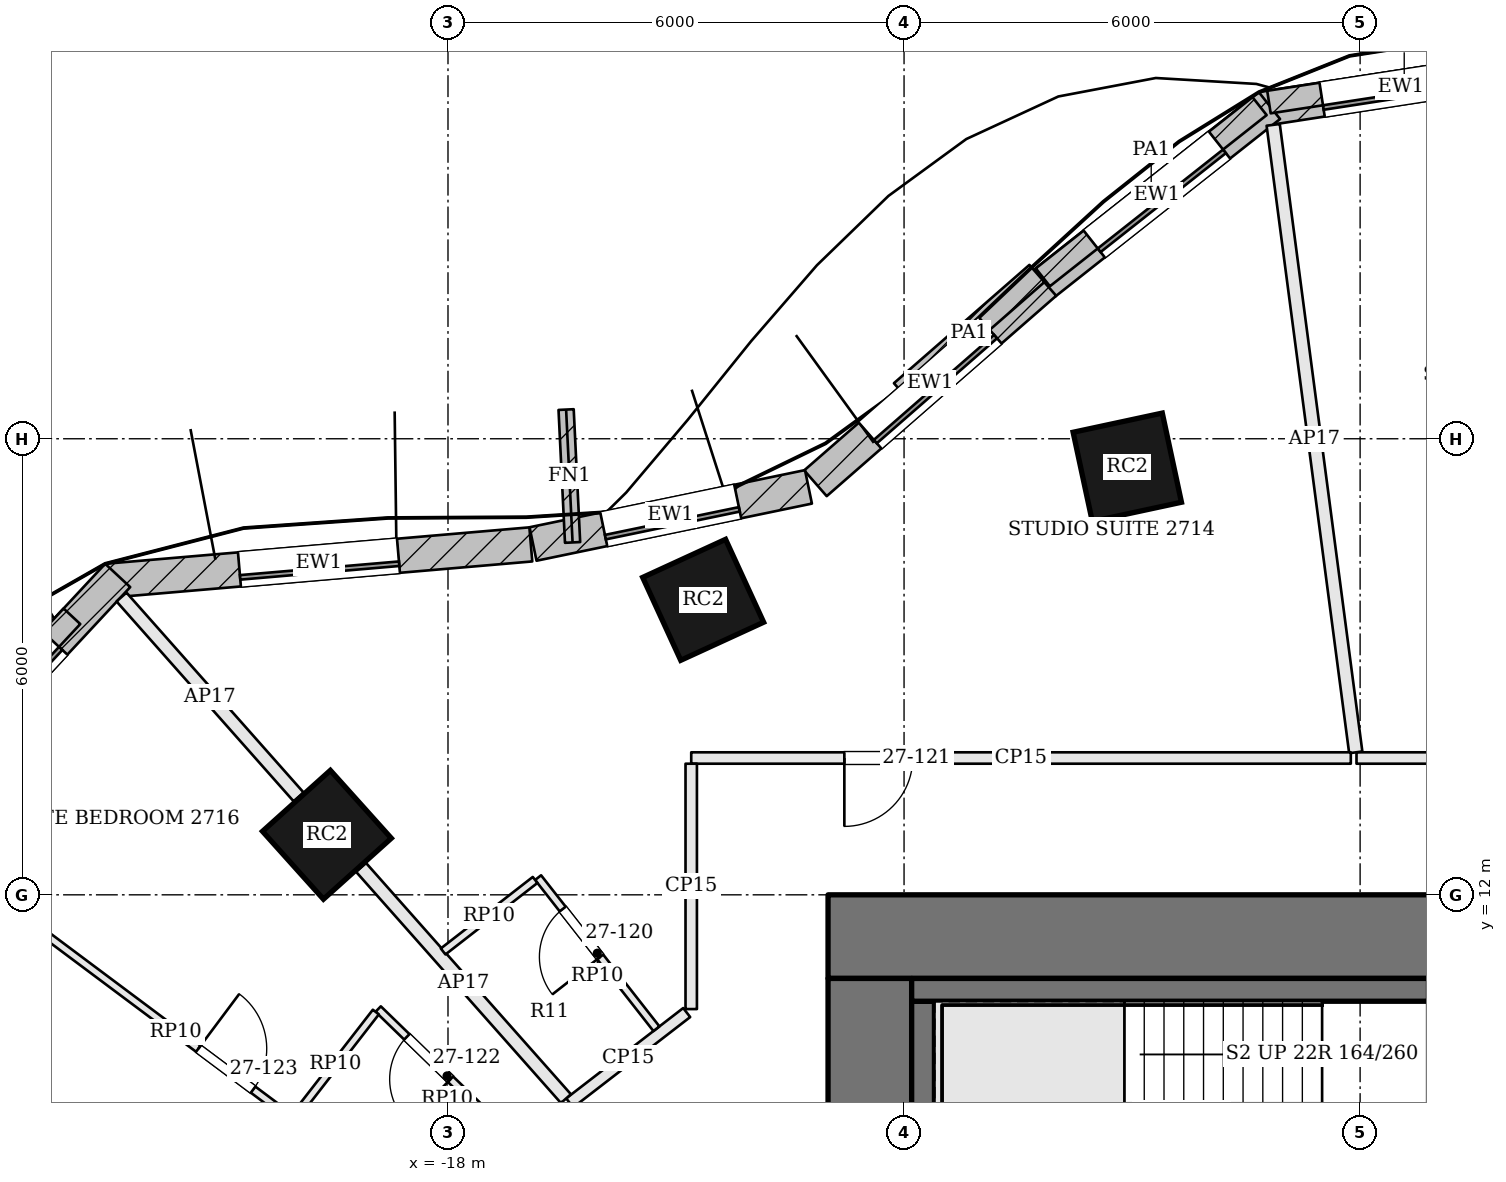
"""IFC4 building model, lengths in metres.
Left out: names, types, materials, properties, quantities, classifications, styles, units other than length and angle.
Written with IfcOpenShell. Run it as: python <this file> out.ifc"""

import sys

from ifc_helpers import new_model, si_unit, direction, frame, frame_2d, origin, origin_2d, place, context, subcontext, project, spatial, rectangle, extrude, element, fill, save


model = new_model("IFC4")
c1 = context("Model", 3, precision=1e-05, world=origin(), true_north=direction((0.0, 1.0)))
c2 = subcontext(c1, "Body", "Model", "MODEL_VIEW")
j1 = project(units=[si_unit("LENGTHUNIT", "METRE"), si_unit("PLANEANGLEUNIT", "RADIAN")], contexts=[c1])
p1 = place(None, origin())
s1 = spatial("IfcSite", under=j1, at=p1, CompositionType="ELEMENT")
p2 = place(p1, origin())
s2 = spatial("IfcBuilding", under=s1, at=p2, CompositionType="ELEMENT")
p3 = place(p2, frame((0.0, 0.0, 114.0)))
s3 = spatial("IfcBuildingStorey", under=s2, at=p3, CompositionType="ELEMENT", Elevation=114.0)
p4 = place(p3, frame((-13.0, 11.45, 0.0), z_axis=(0.0, 0.0, 1.0), x_axis=(1.0, 0.0, 0.0)))
e1 = element("IfcWall", 1, at=p4, inside=s3, PredefinedType="SHEAR", context=c2, shape_type="SweptSolid", body=[
    extrude(rectangle(XDim=26.0, YDim=1.1, at=frame_2d((13.0, 0.0))), origin(), (0.0, 0.0, 1.0), 3.6),
])
p5 = place(p4, frame((9.225, 0.0, 0.0)))
e2 = element("IfcOpeningElement", 2, at=p5, cuts=e1, PredefinedType="OPENING", context=c2, shape_type="SweptSolid", body=[
    extrude(rectangle(XDim=1.0, YDim=2.1, at=frame_2d((0.5, 1.05))), frame((0.0, 0.56, 0.0), z_axis=(0.0, -1.0, 0.0), x_axis=(1.0, 0.0, 0.0)), (0.0, 0.0, 1.0), 1.12),
])
p6 = place(p4, frame((11.825, 0.0, 0.0)))
e3 = element("IfcOpeningElement", 3, at=p6, cuts=e1, PredefinedType="OPENING", context=c2, shape_type="SweptSolid", body=[
    extrude(rectangle(XDim=0.7, YDim=2.1, at=frame_2d((0.35, 1.05))), frame((0.0, 0.56, 0.0), z_axis=(0.0, -1.0, 0.0), x_axis=(1.0, 0.0, 0.0)), (0.0, 0.0, 1.0), 1.12),
])
p7 = place(p4, frame((13.725, 0.0, 0.0)))
e4 = element("IfcOpeningElement", 4, at=p7, cuts=e1, PredefinedType="OPENING", context=c2, shape_type="SweptSolid", body=[
    extrude(rectangle(XDim=1.0, YDim=2.1, at=frame_2d((0.5, 1.05))), frame((0.0, 0.56, 0.0), z_axis=(0.0, -1.0, 0.0), x_axis=(1.0, 0.0, 0.0)), (0.0, 0.0, 1.0), 1.12),
])
p8 = place(p4, frame((16.225, 0.0, 0.0)))
e5 = element("IfcOpeningElement", 5, at=p8, cuts=e1, PredefinedType="OPENING", context=c2, shape_type="SweptSolid", body=[
    extrude(rectangle(XDim=0.9, YDim=2.1, at=frame_2d((0.45, 1.05))), frame((0.0, 0.56, 0.0), z_axis=(0.0, -1.0, 0.0), x_axis=(1.0, 0.0, 0.0)), (0.0, 0.0, 1.0), 1.12),
])
p9 = place(p3, frame((-12.45, -1.9, 0.0), z_axis=(0.0, 0.0, 1.0), x_axis=(0.0, 1.0, 0.0)))
e6 = element("IfcWall", 6, at=p9, inside=s3, PredefinedType="SHEAR", context=c2, shape_type="SweptSolid", body=[
    extrude(rectangle(XDim=12.8, YDim=1.1, at=frame_2d((6.4, 0.0))), origin(), (0.0, 0.0, 1.0), 3.6),
])
p10 = place(p9, frame((3.9, 0.0, 0.0)))
e7 = element("IfcOpeningElement", 7, at=p10, cuts=e6, PredefinedType="OPENING", context=c2, shape_type="SweptSolid", body=[
    extrude(rectangle(XDim=1.8, YDim=2.1, at=frame_2d((0.9, 1.05))), frame((0.0, 0.56, 0.0), z_axis=(0.0, -1.0, 0.0), x_axis=(1.0, 0.0, 0.0)), (0.0, 0.0, 1.0), 1.12),
])
for number, where, z_axis, x_axis in (
    (8, (-9.063, 17.625, 0.0), (0.0, 0.0, 1.0), (-0.978, -0.21, 0.0)),
    (9, (-14.643, 15.881, 0.0), (0.0, 0.0, 1.0), (-0.909, -0.417, 0.0)),
    (10, (-19.593, 12.79, 0.0), (0.0, 0.0, 1.0), (-0.744, -0.668, 0.0)),
):
    element("IfcColumn", number, at=place(p3, frame(where, z_axis=z_axis, x_axis=x_axis)), inside=s3, PredefinedType="COLUMN", context=c2, shape_type="SweptSolid", body=[
        extrude(rectangle(XDim=1.2, YDim=1.2, at=origin_2d()), origin(), (0.0, 0.0, 1.0), 3.6),
    ])
p11 = place(p3, frame((-3.629, 22.905, 0.0), z_axis=(0.0, 0.0, 1.0), x_axis=(-0.988300084321, -0.152521943772, 0.0)))
e11 = element("IfcWall", 11, at=p11, inside=s3, PredefinedType="SOLIDWALL", context=c2, shape_type="SweptSolid", body=[
    extrude(rectangle(XDim=3.71, YDim=0.45, at=frame_2d((1.855, 0.0))), origin(), (0.0, 0.0, 1.0), 3.4),
])
p12 = place(p11, frame((0.805, 0.0, 0.9)))
e12 = element("IfcOpeningElement", 12, at=p12, cuts=e11, PredefinedType="OPENING", context=c2, shape_type="SweptSolid", body=[
    extrude(rectangle(XDim=2.1, YDim=2.0, at=frame_2d((1.05, 1.0))), frame((0.0, 0.235, 0.0), z_axis=(0.0, -1.0, 0.0), x_axis=(1.0, 0.0, 0.0)), (0.0, 0.0, 1.0), 0.47),
])
p13 = place(p3, frame((-7.193, 22.383, 0.0), z_axis=(0.0, 0.0, 1.0), x_axis=(-0.784803291184, -0.619744942816, 0.0)))
e13 = element("IfcWall", 13, at=p13, inside=s3, PredefinedType="SOLIDWALL", context=c2, shape_type="SweptSolid", body=[
    extrude(rectangle(XDim=3.775, YDim=0.45, at=frame_2d((1.887, 0.0))), origin(), (0.0, 0.0, 1.0), 3.4),
])
p14 = place(p13, frame((0.837, 0.0, 0.9)))
e14 = element("IfcOpeningElement", 14, at=p14, cuts=e13, PredefinedType="OPENING", context=c2, shape_type="SweptSolid", body=[
    extrude(rectangle(XDim=2.1, YDim=2.0, at=frame_2d((1.05, 1.0))), frame((0.0, 0.235, 0.0), z_axis=(0.0, -1.0, 0.0), x_axis=(1.0, 0.0, 0.0)), (0.0, 0.0, 1.0), 0.47),
])
p15 = place(p3, frame((-10.146, 20.051, 0.0), z_axis=(0.0, 0.0, 1.0), x_axis=(-0.753278140428, -0.657702093013, 0.0)))
e15 = element("IfcWall", 15, at=p15, inside=s3, PredefinedType="SOLIDWALL", context=c2, shape_type="SweptSolid", body=[
    extrude(rectangle(XDim=4.008, YDim=0.45, at=frame_2d((2.004, 0.0))), origin(), (0.0, 0.0, 1.0), 3.4),
])
p16 = place(p15, frame((0.954, 0.0, 0.9)))
e16 = element("IfcOpeningElement", 16, at=p16, cuts=e15, PredefinedType="OPENING", context=c2, shape_type="SweptSolid", body=[
    extrude(rectangle(XDim=2.1, YDim=2.0, at=frame_2d((1.05, 1.0))), frame((0.0, 0.235, 0.0), z_axis=(0.0, -1.0, 0.0), x_axis=(1.0, 0.0, 0.0)), (0.0, 0.0, 1.0), 0.47),
])
p17 = place(p3, frame((-13.258, 17.367, 0.0), z_axis=(0.0, 0.0, 1.0), x_axis=(-0.97914968674, -0.203140077183, 0.0)))
e17 = element("IfcWall", 17, at=p17, inside=s3, PredefinedType="SOLIDWALL", context=c2, shape_type="SweptSolid", body=[
    extrude(rectangle(XDim=3.7, YDim=0.45, at=frame_2d((1.85, 0.0))), origin(), (0.0, 0.0, 1.0), 3.4),
])
p18 = place(p17, frame((0.95, 0.0, 0.9)))
e18 = element("IfcOpeningElement", 18, at=p18, cuts=e17, PredefinedType="OPENING", context=c2, shape_type="SweptSolid", body=[
    extrude(rectangle(XDim=1.8, YDim=2.0, at=frame_2d((0.9, 1.0))), frame((0.0, 0.235, 0.0), z_axis=(0.0, -1.0, 0.0), x_axis=(1.0, 0.0, 0.0)), (0.0, 0.0, 1.0), 0.47),
])
p19 = place(p3, frame((-16.91, 16.61, 0.0), z_axis=(0.0, 0.0, 1.0), x_axis=(-0.996333165816, -0.085558299972, 0.0)))
e19 = element("IfcWall", 19, at=p19, inside=s3, PredefinedType="SOLIDWALL", context=c2, shape_type="SweptSolid", body=[
    extrude(rectangle(XDim=5.596, YDim=0.45, at=frame_2d((2.798, 0.0))), origin(), (0.0, 0.0, 1.0), 3.4),
])
p20 = place(p19, frame((1.748, 0.0, 0.9)))
e20 = element("IfcOpeningElement", 20, at=p20, cuts=e19, PredefinedType="OPENING", context=c2, shape_type="SweptSolid", body=[
    extrude(rectangle(XDim=2.1, YDim=2.0, at=frame_2d((1.05, 1.0))), frame((0.0, 0.235, 0.0), z_axis=(0.0, -1.0, 0.0), x_axis=(1.0, 0.0, 0.0)), (0.0, 0.0, 1.0), 0.47),
])
p21 = place(p3, frame((-22.345, 16.202, 0.0), z_axis=(0.0, 0.0, 1.0), x_axis=(-0.681249161265, -0.732051624051, 0.0)))
e21 = element("IfcWall", 21, at=p21, inside=s3, PredefinedType="SOLIDWALL", context=c2, shape_type="SweptSolid", body=[
    extrude(rectangle(XDim=4.527, YDim=0.45, at=frame_2d((2.263, 0.0))), origin(), (0.0, 0.0, 1.0), 3.4),
])
p22 = place(p21, frame((1.213, 0.0, 0.9)))
e22 = element("IfcOpeningElement", 22, at=p22, cuts=e21, PredefinedType="OPENING", context=c2, shape_type="SweptSolid", body=[
    extrude(rectangle(XDim=2.1, YDim=2.0, at=frame_2d((1.05, 1.0))), frame((0.0, 0.235, 0.0), z_axis=(0.0, -1.0, 0.0), x_axis=(1.0, 0.0, 0.0)), (0.0, 0.0, 1.0), 0.47),
])
p23 = place(p3, frame((-16.361, 16.636, 0.0), z_axis=(0.0, 0.0, 1.0), x_axis=(-0.048552811097, 0.998820616795, 0.0)))
e23 = element("IfcWall", 23, at=p23, inside=s3, PredefinedType="SOLIDWALL", context=c2, shape_type="SweptSolid", body=[
    extrude(rectangle(XDim=1.75, YDim=0.2, at=frame_2d((0.875, 0.0))), origin(), (0.0, 0.0, 1.0), 3.4),
])
p24 = place(p3, frame((-3.64, 22.979, 3.6), z_axis=(0.0, 0.0, 1.0), x_axis=(-0.988299486994, -0.152525814235, 0.0)))
e24 = element("IfcWall", 24, at=p24, inside=s3, PredefinedType="PARAPET", context=c2, shape_type="SweptSolid", body=[
    extrude(rectangle(XDim=3.602, YDim=0.3, at=frame_2d((1.801, 0.0))), origin(), (0.0, 0.0, 1.0), 1.1),
])
p25 = place(p3, frame((-7.323, 22.376, 3.6), z_axis=(0.0, 0.0, 1.0), x_axis=(-0.784819122577, -0.61972489448, 0.0)))
e25 = element("IfcWall", 25, at=p25, inside=s3, PredefinedType="PARAPET", context=c2, shape_type="SweptSolid", body=[
    extrude(rectangle(XDim=3.633, YDim=0.3, at=frame_2d((1.817, 0.0))), origin(), (0.0, 0.0, 1.0), 1.1),
])
p26 = place(p3, frame((-10.252, 20.174, 3.6), z_axis=(0.0, 0.0, 1.0), x_axis=(-0.753260147018, -0.657722700622, 0.0)))
e26 = element("IfcWall", 26, at=p26, inside=s3, PredefinedType="PARAPET", context=c2, shape_type="SweptSolid", body=[
    extrude(rectangle(XDim=2.366, YDim=0.3, at=frame_2d((1.183, 0.0))), origin(), (0.0, 0.0, 1.0), 1.1),
])
p27 = place(p3, frame((-22.948, 15.665, 3.6), z_axis=(0.0, 0.0, 1.0), x_axis=(-0.681269800001, -0.732032417046, 0.0)))
e27 = element("IfcWall", 27, at=p27, inside=s3, PredefinedType="PARAPET", context=c2, shape_type="SweptSolid", body=[
    extrude(rectangle(XDim=3.578, YDim=0.3, at=frame_2d((1.789, 0.0))), origin(), (0.0, 0.0, 1.0), 1.1),
])
p28 = place(p3, frame((-11.75, 7.65, 0.0), z_axis=(0.0, 0.0, 1.0), x_axis=(0.0, 1.0, 0.0)))
e28 = element("IfcWall", 28, at=p28, inside=s3, PredefinedType="SOLIDWALL", context=c2, shape_type="SweptSolid", body=[
    extrude(rectangle(XDim=2.95, YDim=0.3, at=frame_2d((1.475, 0.0))), origin(), (0.0, 0.0, 1.0), 3.4),
])
p29 = place(p3, frame((-11.9, 10.75, 0.0), z_axis=(0.0, 0.0, 1.0), x_axis=(1.0, 0.0, 0.0)))
e29 = element("IfcWall", 29, at=p29, inside=s3, PredefinedType="SOLIDWALL", context=c2, shape_type="SweptSolid", body=[
    extrude(rectangle(XDim=6.8, YDim=0.3, at=frame_2d((3.4, 0.0))), origin(), (0.0, 0.0, 1.0), 3.4),
])
p30 = place(p3, frame((5.777, 13.8, 0.0), z_axis=(0.0, 0.0, 1.0), x_axis=(-1.0, 0.0, 0.0)))
e30 = element("IfcWall", 30, at=p30, inside=s3, PredefinedType="PARTITIONING", context=c2, shape_type="SweptSolid", body=[
    extrude(rectangle(XDim=11.824, YDim=0.15, at=frame_2d((5.912, 0.0))), origin(), (0.0, 0.0, 1.0), 2.784),
])
p31 = place(p30, frame((8.402, 0.0, 0.0)))
e31 = element("IfcOpeningElement", 31, at=p31, cuts=e30, PredefinedType="OPENING", context=c2, shape_type="SweptSolid", body=[
    extrude(rectangle(XDim=1.0, YDim=2.1, at=frame_2d((0.5, 1.05))), frame((0.0, 0.085, 0.0), z_axis=(0.0, -1.0, 0.0), x_axis=(1.0, 0.0, 0.0)), (0.0, 0.0, 1.0), 0.17),
])
p32 = place(p3, frame((-7.144, 22.13, 0.0), z_axis=(0.0, 0.0, 1.0), x_axis=(0.130452237095, -0.991454594945, 0.0)))
e32 = element("IfcWall", 32, at=p32, inside=s3, PredefinedType="PARTITIONING", context=c2, shape_type="SweptSolid", body=[
    extrude(rectangle(XDim=8.326, YDim=0.175, at=frame_2d((4.163, 0.0))), origin(), (0.0, 0.0, 1.0), 2.784),
])
p33 = place(p3, frame((-6.123, 13.8, 0.0), z_axis=(0.0, 0.0, 1.0), x_axis=(-1.0, 0.0, 0.0)))
e33 = element("IfcWall", 33, at=p33, inside=s3, PredefinedType="PARTITIONING", context=c2, shape_type="SweptSolid", body=[
    extrude(rectangle(XDim=8.677, YDim=0.15, at=frame_2d((4.339, 0.0))), origin(), (0.0, 0.0, 1.0), 2.784),
])
p34 = place(p33, frame((5.763, 0.0, 0.0)))
e34 = element("IfcOpeningElement", 34, at=p34, cuts=e33, PredefinedType="OPENING", context=c2, shape_type="SweptSolid", body=[
    extrude(rectangle(XDim=0.9, YDim=2.4, at=frame_2d((0.45, 1.2))), frame((0.0, 0.085, 0.0), z_axis=(0.0, -1.0, 0.0), x_axis=(1.0, 0.0, 0.0)), (0.0, 0.0, 1.0), 0.17),
])
p35 = place(p3, frame((-14.8, 13.725, 0.0), z_axis=(0.0, 0.0, 1.0), x_axis=(0.0, -1.0, 0.0)))
e35 = element("IfcWall", 35, at=p35, inside=s3, PredefinedType="PARTITIONING", context=c2, shape_type="SweptSolid", body=[
    extrude(rectangle(XDim=3.228, YDim=0.15, at=frame_2d((1.614, 0.0))), origin(), (0.0, 0.0, 1.0), 2.784),
])
p36 = place(p3, frame((-14.86, 10.451, 0.0), z_axis=(0.0, 0.0, 1.0), x_axis=(-0.791530658389, -0.611129459959, 0.0)))
e36 = element("IfcWall", 36, at=p36, inside=s3, PredefinedType="PARTITIONING", context=c2, shape_type="SweptSolid", body=[
    extrude(rectangle(XDim=1.945, YDim=0.15, at=frame_2d((0.972, 0.0))), origin(), (0.0, 0.0, 1.0), 2.784),
])
p37 = place(p3, frame((-22.295, 15.918, 0.0), z_axis=(0.0, 0.0, 1.0), x_axis=(0.663107572679, -0.748524112541, 0.0)))
e37 = element("IfcWall", 37, at=p37, inside=s3, PredefinedType="PARTITIONING", context=c2, shape_type="SweptSolid", body=[
    extrude(rectangle(XDim=3.513, YDim=0.175, at=frame_2d((1.756, 0.0))), origin(), (0.0, 0.0, 1.0), 2.784),
])
p38 = place(p3, frame((-19.143, 12.36, 0.0), z_axis=(0.0, 0.0, 1.0), x_axis=(0.663132391124, -0.748502125476, 0.0)))
e38 = element("IfcWall", 38, at=p38, inside=s3, PredefinedType="PARTITIONING", context=c2, shape_type="SweptSolid", body=[
    extrude(rectangle(XDim=4.064, YDim=0.175, at=frame_2d((2.032, 0.0))), origin(), (0.0, 0.0, 1.0), 2.784),
])
p39 = place(p3, frame((-16.458, 9.217, 0.0), z_axis=(0.0, 0.0, 1.0), x_axis=(-0.791661143807, -0.610960418837, 0.0)))
e39 = element("IfcWall", 39, at=p39, inside=s3, PredefinedType="PARTITIONING", context=c2, shape_type="SweptSolid", body=[
    extrude(rectangle(XDim=0.585, YDim=0.15, at=frame_2d((0.292, 0.0))), origin(), (0.0, 0.0, 1.0), 2.784),
])
p40 = place(p3, frame((-15.258, 10.238, 0.0), z_axis=(0.0, 0.0, 1.0), x_axis=(-0.616501171545, 0.787353989946, 0.0)))
e40 = element("IfcWall", 40, at=p40, inside=s3, PredefinedType="PARTITIONING", context=c2, shape_type="SweptSolid", body=[
    extrude(rectangle(XDim=2.525, YDim=0.1, at=frame_2d((1.262, 0.0))), origin(), (0.0, 0.0, 1.0), 2.884),
])
p41 = place(p40, frame((1.2, 0.0, 0.0)))
e41 = element("IfcOpeningElement", 41, at=p41, cuts=e40, PredefinedType="OPENING", context=c2, shape_type="SweptSolid", body=[
    extrude(rectangle(XDim=0.8, YDim=2.1, at=frame_2d((0.4, 1.05))), frame((0.0, 0.06, 0.0), z_axis=(0.0, -1.0, 0.0), x_axis=(1.0, 0.0, 0.0)), (0.0, 0.0, 1.0), 0.12),
])
p42 = place(p3, frame((-16.854, 12.196, 0.0), z_axis=(0.0, 0.0, 1.0), x_axis=(-0.789403675078, -0.613874447891, 0.0)))
e42 = element("IfcWall", 42, at=p42, inside=s3, PredefinedType="PARTITIONING", context=c2, shape_type="SweptSolid", body=[
    extrude(rectangle(XDim=1.533, YDim=0.1, at=frame_2d((0.766, 0.0))), origin(), (0.0, 0.0, 1.0), 2.884),
])
p43 = place(p3, frame((-25.143, 12.858, 0.0), z_axis=(0.0, 0.0, 1.0), x_axis=(0.801115721268, -0.598509482913, 0.0)))
e43 = element("IfcWall", 43, at=p43, inside=s3, PredefinedType="PARTITIONING", context=c2, shape_type="SweptSolid", body=[
    extrude(rectangle(XDim=8.89, YDim=0.1, at=frame_2d((4.445, 0.0))), origin(), (0.0, 0.0, 1.0), 2.884),
])
p44 = place(p43, frame((4.816, 0.0, 0.0)))
e44 = element("IfcOpeningElement", 44, at=p44, cuts=e43, PredefinedType="OPENING", context=c2, shape_type="SweptSolid", body=[
    extrude(rectangle(XDim=0.9, YDim=2.4, at=frame_2d((0.45, 1.2))), frame((0.0, 0.06, 0.0), z_axis=(0.0, -1.0, 0.0), x_axis=(1.0, 0.0, 0.0)), (0.0, 0.0, 1.0), 0.12),
])
p45 = place(p3, frame((-17.107, 8.738, 0.0), z_axis=(0.0, 0.0, 1.0), x_axis=(-0.717471254284, 0.696588113074, 0.0)))
e45 = element("IfcWall", 45, at=p45, inside=s3, PredefinedType="PARTITIONING", context=c2, shape_type="SweptSolid", body=[
    extrude(rectangle(XDim=2.525, YDim=0.1, at=frame_2d((1.263, 0.0))), origin(), (0.0, 0.0, 1.0), 2.884),
])
p46 = place(p45, frame((1.2, 0.0, 0.0)))
e46 = element("IfcOpeningElement", 46, at=p46, cuts=e45, PredefinedType="OPENING", context=c2, shape_type="SweptSolid", body=[
    extrude(rectangle(XDim=0.8, YDim=2.1, at=frame_2d((0.4, 1.05))), frame((0.0, 0.06, 0.0), z_axis=(0.0, -1.0, 0.0), x_axis=(1.0, 0.0, 0.0)), (0.0, 0.0, 1.0), 0.12),
])
p47 = place(p3, frame((-18.949, 10.458, 0.0), z_axis=(0.0, 0.0, 1.0), x_axis=(-0.613092531391, -0.790011106221, 0.0)))
e47 = element("IfcWall", 47, at=p47, inside=s3, PredefinedType="PARTITIONING", context=c2, shape_type="SweptSolid", body=[
    extrude(rectangle(XDim=1.735, YDim=0.1, at=frame_2d((0.867, 0.0))), origin(), (0.0, 0.0, 1.0), 2.884),
])
p48 = place(p12, origin())
e48 = element("IfcWindow", 48, at=p48, inside=s3, PartitioningType="SINGLE_PANEL", PredefinedType="WINDOW", context=c2, shape_type="SweptSolid", body=[
    extrude(rectangle(XDim=2.1, YDim=2.0, at=frame_2d((1.05, 1.0))), frame((0.0, 0.135, 0.0), z_axis=(0.0, -1.0, 0.0), x_axis=(1.0, 0.0, 0.0)), (0.0, 0.0, 1.0), 0.06),
])
fill(e12, e48)
p49 = place(p14, origin())
e49 = element("IfcWindow", 49, at=p49, inside=s3, PartitioningType="SINGLE_PANEL", PredefinedType="WINDOW", context=c2, shape_type="SweptSolid", body=[
    extrude(rectangle(XDim=2.1, YDim=2.0, at=frame_2d((1.05, 1.0))), frame((0.0, 0.135, 0.0), z_axis=(0.0, -1.0, 0.0), x_axis=(1.0, 0.0, 0.0)), (0.0, 0.0, 1.0), 0.06),
])
fill(e14, e49)
p50 = place(p16, origin())
e50 = element("IfcWindow", 50, at=p50, inside=s3, PartitioningType="SINGLE_PANEL", PredefinedType="WINDOW", context=c2, shape_type="SweptSolid", body=[
    extrude(rectangle(XDim=2.1, YDim=2.0, at=frame_2d((1.05, 1.0))), frame((0.0, 0.135, 0.0), z_axis=(0.0, -1.0, 0.0), x_axis=(1.0, 0.0, 0.0)), (0.0, 0.0, 1.0), 0.06),
])
fill(e16, e50)
p51 = place(p18, origin())
e51 = element("IfcWindow", 51, at=p51, inside=s3, PartitioningType="SINGLE_PANEL", PredefinedType="WINDOW", context=c2, shape_type="SweptSolid", body=[
    extrude(rectangle(XDim=1.8, YDim=2.0, at=frame_2d((0.9, 1.0))), frame((0.0, 0.135, 0.0), z_axis=(0.0, -1.0, 0.0), x_axis=(1.0, 0.0, 0.0)), (0.0, 0.0, 1.0), 0.06),
])
fill(e18, e51)
p52 = place(p20, origin())
e52 = element("IfcWindow", 52, at=p52, inside=s3, PartitioningType="SINGLE_PANEL", PredefinedType="WINDOW", context=c2, shape_type="SweptSolid", body=[
    extrude(rectangle(XDim=2.1, YDim=2.0, at=frame_2d((1.05, 1.0))), frame((0.0, 0.135, 0.0), z_axis=(0.0, -1.0, 0.0), x_axis=(1.0, 0.0, 0.0)), (0.0, 0.0, 1.0), 0.06),
])
fill(e20, e52)
p53 = place(p22, origin())
e53 = element("IfcWindow", 53, at=p53, inside=s3, PartitioningType="SINGLE_PANEL", PredefinedType="WINDOW", context=c2, shape_type="SweptSolid", body=[
    extrude(rectangle(XDim=2.1, YDim=2.0, at=frame_2d((1.05, 1.0))), frame((0.0, 0.135, 0.0), z_axis=(0.0, -1.0, 0.0), x_axis=(1.0, 0.0, 0.0)), (0.0, 0.0, 1.0), 0.06),
])
fill(e22, e53)
p54 = place(p41, origin())
e54 = element("IfcDoor", 54, at=p54, inside=s3, OperationType="SINGLE_SWING_LEFT", PredefinedType="DOOR", context=c2, shape_type="SweptSolid", body=[
    extrude(rectangle(XDim=0.8, YDim=2.1, at=frame_2d((0.4, 1.05))), frame((0.0, 0.025, 0.0), z_axis=(0.0, -1.0, 0.0), x_axis=(1.0, 0.0, 0.0)), (0.0, 0.0, 1.0), 0.05),
])
fill(e41, e54)
p55 = place(p34, origin())
e55 = element("IfcDoor", 55, at=p55, inside=s3, OperationType="SINGLE_SWING_RIGHT", PredefinedType="DOOR", context=c2, shape_type="SweptSolid", body=[
    extrude(rectangle(XDim=0.9, YDim=2.4, at=frame_2d((0.45, 1.2))), frame((0.0, 0.025, 0.0), z_axis=(0.0, -1.0, 0.0), x_axis=(1.0, 0.0, 0.0)), (0.0, 0.0, 1.0), 0.05),
])
fill(e34, e55)
p56 = place(p46, origin())
e56 = element("IfcDoor", 56, at=p56, inside=s3, OperationType="SINGLE_SWING_LEFT", PredefinedType="DOOR", context=c2, shape_type="SweptSolid", body=[
    extrude(rectangle(XDim=0.8, YDim=2.1, at=frame_2d((0.4, 1.05))), frame((0.0, 0.025, 0.0), z_axis=(0.0, -1.0, 0.0), x_axis=(1.0, 0.0, 0.0)), (0.0, 0.0, 1.0), 0.05),
])
fill(e46, e56)
p57 = place(p44, origin())
e57 = element("IfcDoor", 57, at=p57, inside=s3, OperationType="SINGLE_SWING_LEFT", PredefinedType="DOOR", context=c2, shape_type="SweptSolid", body=[
    extrude(rectangle(XDim=0.9, YDim=2.4, at=frame_2d((0.45, 1.2))), frame((0.0, 0.025, 0.0), z_axis=(0.0, -1.0, 0.0), x_axis=(1.0, 0.0, 0.0)), (0.0, 0.0, 1.0), 0.05),
])
fill(e44, e57)
save(model, sys.argv[1])
